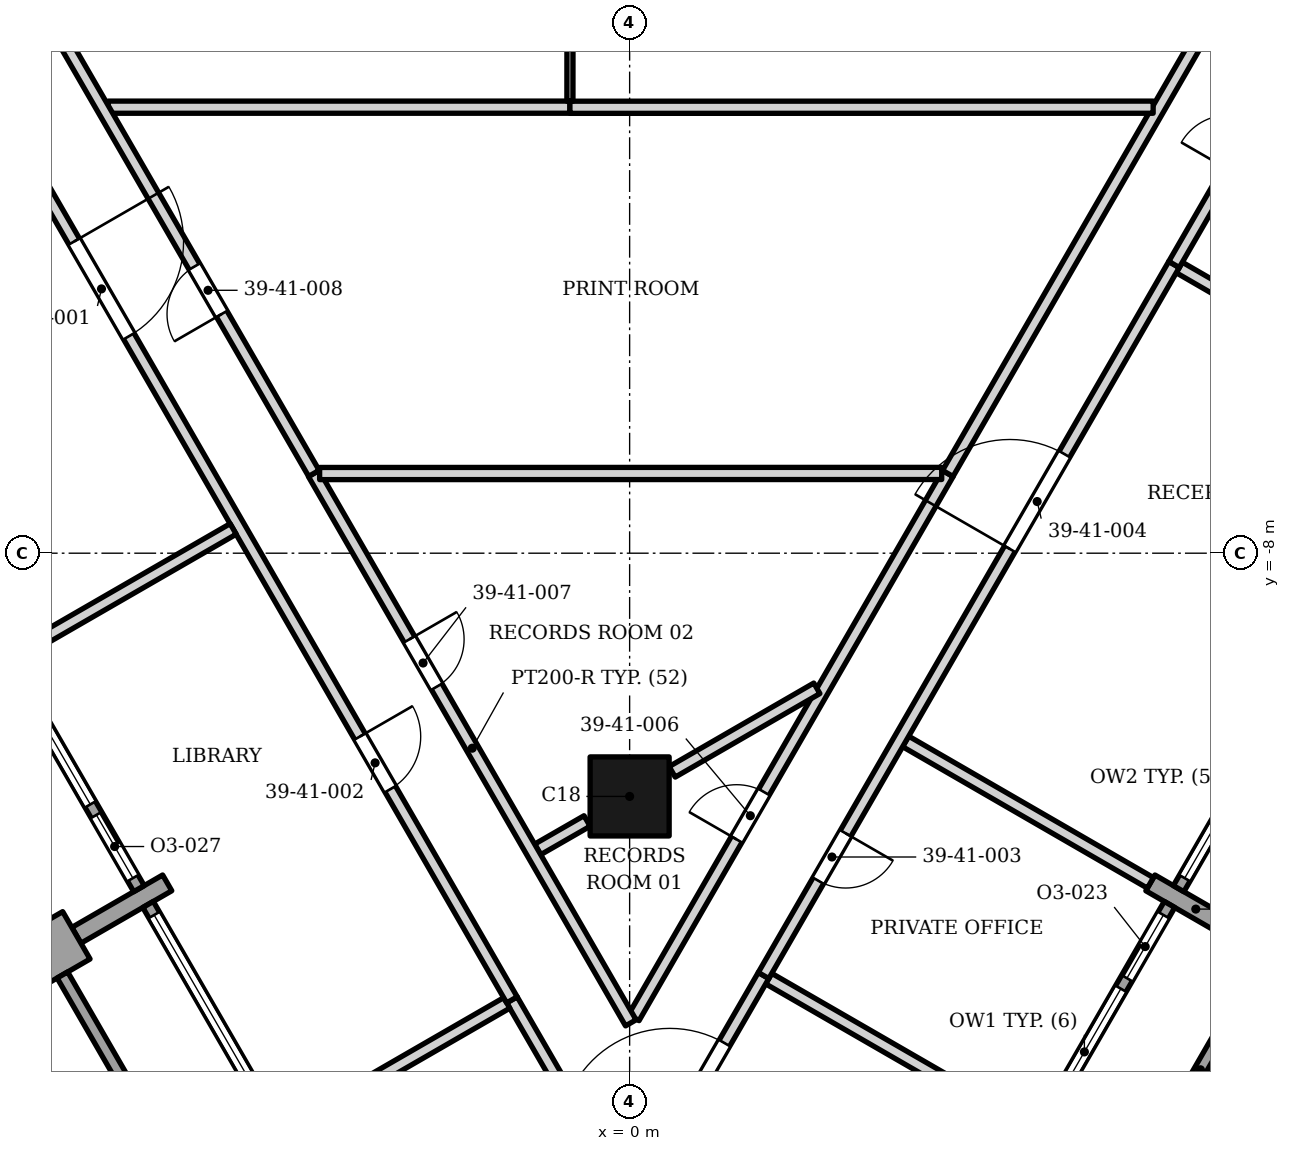
"""IFC4 building model, lengths in metres.
Left out: names, types, materials, properties, quantities, classifications, styles, units other than length and angle.
Written with IfcOpenShell. Run it as: python <this file> out.ifc"""

import sys

from ifc_helpers import new_model, si_unit, direction, frame, frame_2d, origin, origin_2d, place, context, subcontext, project, spatial, rectangle, extrude, element, fill, save


model = new_model("IFC4")
c1 = context("Model", 3, precision=1e-05, world=origin(), true_north=direction((0.0, 1.0)))
c2 = subcontext(c1, "Body", "Model", "MODEL_VIEW")
j1 = project(units=[si_unit("LENGTHUNIT", "METRE"), si_unit("PLANEANGLEUNIT", "RADIAN")], contexts=[c1])
p1 = place(None, origin())
s1 = spatial("IfcSite", under=j1, at=p1, CompositionType="ELEMENT")
p2 = place(p1, origin())
s2 = spatial("IfcBuilding", under=s1, at=p2, CompositionType="ELEMENT")
p3 = place(p2, frame((0.0, 0.0, 168.0)))
s3 = spatial("IfcBuildingStorey", under=s2, at=p3, CompositionType="ELEMENT", Elevation=168.0)
p4 = place(p3, frame((0.0, -12.0, 0.0), z_axis=(0.0, 0.0, 1.0), x_axis=(1.0, 0.0, 0.0)))
e1 = element("IfcColumn", 1, at=p4, inside=s3, PredefinedType="COLUMN", context=c2, shape_type="SweptSolid", body=[
    extrude(rectangle(XDim=1.3, YDim=1.3, at=origin_2d()), origin(), (0.0, 0.0, 1.0), 3.9),
])
p5 = place(p3, frame((-10.008, -14.809, 0.0), z_axis=(0.0, 0.0, 1.0), x_axis=(0.866088799389, 0.499890179513, 0.0)))
e2 = element("IfcWall", 2, at=p5, inside=s3, PredefinedType="SOLIDWALL", context=c2, shape_type="SweptSolid", body=[
    extrude(rectangle(XDim=1.05, YDim=0.9, at=frame_2d((0.525, 0.0))), origin(), (0.0, 0.0, 1.0), 3.0),
])
p6 = place(p3, frame((-9.099, -14.284, 0.0), z_axis=(0.0, 0.0, 1.0), x_axis=(0.866013532718, 0.500020560727, 0.0)))
e3 = element("IfcWall", 3, at=p6, inside=s3, PredefinedType="SOLIDWALL", context=c2, shape_type="SweptSolid", body=[
    extrude(rectangle(XDim=1.725, YDim=0.3, at=frame_2d((0.863, 0.0))), origin(), (0.0, 0.0, 1.0), 3.0),
])
p7 = place(p3, frame((-10.17, -9.879, 0.0), z_axis=(0.0, 0.0, 1.0), x_axis=(0.500002543286, -0.866023935413, 0.0)))
e4 = element("IfcWall", 4, at=p7, inside=s3, PredefinedType="ELEMENTEDWALL", context=c2, shape_type="SweptSolid", body=[
    extrude(rectangle(XDim=4.2, YDim=0.2, at=frame_2d((2.1, 0.0))), origin(), (0.0, 0.0, 1.0), 2.95),
])
p8 = place(p7, frame((0.2, 0.0, 0.45)))
e5 = element("IfcOpeningElement", 5, at=p8, cuts=e4, PredefinedType="OPENING", context=c2, shape_type="SweptSolid", body=[
    extrude(rectangle(XDim=2.4, YDim=2.25, at=frame_2d((1.2, 1.125))), frame((0.0, 0.11, 0.0), z_axis=(0.0, -1.0, 0.0), x_axis=(1.0, 0.0, 0.0)), (0.0, 0.0, 1.0), 0.22),
])
p9 = place(p7, frame((2.8, 0.0, 0.0)))
e6 = element("IfcOpeningElement", 6, at=p9, cuts=e4, PredefinedType="OPENING", context=c2, shape_type="SweptSolid", body=[
    extrude(rectangle(XDim=1.2, YDim=2.7, at=frame_2d((0.6, 1.35))), frame((0.0, 0.11, 0.0), z_axis=(0.0, -1.0, 0.0), x_axis=(1.0, 0.0, 0.0)), (0.0, 0.0, 1.0), 0.22),
])
p10 = place(p3, frame((-9.329, -14.936, 0.0), z_axis=(0.0, 0.0, 1.0), x_axis=(0.500012057535, -0.866018442252, 0.0)))
e7 = element("IfcWall", 7, at=p10, inside=s3, PredefinedType="SOLIDWALL", context=c2, shape_type="SweptSolid", body=[
    extrude(rectangle(XDim=3.6, YDim=0.2, at=frame_2d((1.8, 0.0))), origin(), (0.0, 0.0, 1.0), 3.0),
])
p11 = place(p3, frame((-7.92, -13.777, 0.0), z_axis=(0.0, 0.0, 1.0), x_axis=(0.500027713859, -0.866009402589, 0.0)))
e8 = element("IfcWall", 8, at=p11, inside=s3, PredefinedType="ELEMENTEDWALL", context=c2, shape_type="SweptSolid", body=[
    extrude(rectangle(XDim=4.2, YDim=0.2, at=frame_2d((2.1, 0.0))), origin(), (0.0, 0.0, 1.0), 3.0),
])
p12 = place(p11, frame((0.2, 0.0, 0.45)))
e9 = element("IfcOpeningElement", 9, at=p12, cuts=e8, PredefinedType="OPENING", context=c2, shape_type="SweptSolid", body=[
    extrude(rectangle(XDim=3.8, YDim=2.25, at=frame_2d((1.9, 1.125))), frame((0.0, 0.11, 0.0), z_axis=(0.0, -1.0, 0.0), x_axis=(1.0, 0.0, 0.0)), (0.0, 0.0, 1.0), 0.22),
])
p13 = place(p3, frame((10.058, -14.284, 0.0), z_axis=(0.0, 0.0, 1.0), x_axis=(-0.866013532718, 0.500020560727, 0.0)))
e10 = element("IfcWall", 10, at=p13, inside=s3, PredefinedType="SOLIDWALL", context=c2, shape_type="SweptSolid", body=[
    extrude(rectangle(XDim=1.725, YDim=0.3, at=frame_2d((0.863, 0.0))), origin(), (0.0, 0.0, 1.0), 3.0),
])
p14 = place(p3, frame((8.488, -18.054, 0.0), z_axis=(0.0, 0.0, 1.0), x_axis=(0.500012057535, 0.866018442252, 0.0)))
e11 = element("IfcWall", 11, at=p14, inside=s3, PredefinedType="SOLIDWALL", context=c2, shape_type="SweptSolid", body=[
    extrude(rectangle(XDim=3.6, YDim=0.2, at=frame_2d((1.8, 0.0))), origin(), (0.0, 0.0, 1.0), 3.0),
])
p15 = place(p3, frame((6.779, -17.414, 0.0), z_axis=(0.0, 0.0, 1.0), x_axis=(0.500027713859, 0.866009402589, 0.0)))
e12 = element("IfcWall", 12, at=p15, inside=s3, PredefinedType="ELEMENTEDWALL", context=c2, shape_type="SweptSolid", body=[
    extrude(rectangle(XDim=4.2, YDim=0.2, at=frame_2d((2.1, 0.0))), origin(), (0.0, 0.0, 1.0), 3.0),
])
p16 = place(p15, frame((0.2, 0.0, 0.45)))
e13 = element("IfcOpeningElement", 13, at=p16, cuts=e12, PredefinedType="OPENING", context=c2, shape_type="SweptSolid", body=[
    extrude(rectangle(XDim=2.4, YDim=2.25, at=frame_2d((1.2, 1.125))), frame((0.0, 0.11, 0.0), z_axis=(0.0, -1.0, 0.0), x_axis=(1.0, 0.0, 0.0)), (0.0, 0.0, 1.0), 0.22),
])
p17 = place(p15, frame((2.8, 0.0, 0.0)))
e14 = element("IfcOpeningElement", 14, at=p17, cuts=e12, PredefinedType="OPENING", context=c2, shape_type="SweptSolid", body=[
    extrude(rectangle(XDim=1.2, YDim=2.7, at=frame_2d((0.6, 1.35))), frame((0.0, 0.11, 0.0), z_axis=(0.0, -1.0, 0.0), x_axis=(1.0, 0.0, 0.0)), (0.0, 0.0, 1.0), 0.22),
])
p18 = place(p3, frame((9.029, -13.517, 0.0), z_axis=(0.0, 0.0, 1.0), x_axis=(0.500002543286, 0.866023935413, 0.0)))
e15 = element("IfcWall", 15, at=p18, inside=s3, PredefinedType="ELEMENTEDWALL", context=c2, shape_type="SweptSolid", body=[
    extrude(rectangle(XDim=4.2, YDim=0.2, at=frame_2d((2.1, 0.0))), origin(), (0.0, 0.0, 1.0), 2.95),
])
p19 = place(p18, frame((0.2, 0.0, 0.45)))
e16 = element("IfcOpeningElement", 16, at=p19, cuts=e15, PredefinedType="OPENING", context=c2, shape_type="SweptSolid", body=[
    extrude(rectangle(XDim=3.8, YDim=2.25, at=frame_2d((1.9, 1.125))), frame((0.0, 0.11, 0.0), z_axis=(0.0, -1.0, 0.0), x_axis=(1.0, 0.0, 0.0)), (0.0, 0.0, 1.0), 0.22),
])
p20 = place(p3, frame((-1.936, -15.345, 0.0), z_axis=(0.0, 0.0, 1.0), x_axis=(0.500383446004, -0.865803907918, 0.0)))
e17 = element("IfcWall", 17, at=p20, inside=s3, PredefinedType="PARTITIONING", context=c2, shape_type="SweptSolid", body=[
    extrude(rectangle(XDim=3.804, YDim=0.2, at=frame_2d((1.902, 0.0))), origin(), (0.0, 0.0, 1.0), 3.128),
])
p21 = place(p3, frame((2.287, -14.996, 0.0), z_axis=(0.0, 0.0, 1.0), x_axis=(0.866183837695, -0.499725483956, 0.0)))
e18 = element("IfcWall", 18, at=p21, inside=s3, PredefinedType="PARTITIONING", context=c2, shape_type="SweptSolid", body=[
    extrude(rectangle(XDim=4.649, YDim=0.2, at=frame_2d((2.325, 0.0))), origin(), (0.0, 0.0, 1.0), 3.052),
])
p22 = place(p3, frame((0.068, -15.638, 0.0), z_axis=(0.0, 0.0, 1.0), x_axis=(0.499989755964, 0.866031318101, 0.0)))
e19 = element("IfcWall", 19, at=p22, inside=s3, PredefinedType="PARTITIONING", context=c2, shape_type="SweptSolid", body=[
    extrude(rectangle(XDim=10.331, YDim=0.2, at=frame_2d((5.166, 0.0))), origin(), (0.0, 0.0, 1.0), 2.884),
])
p23 = place(p22, frame((3.385, 0.0, 0.0)))
e20 = element("IfcOpeningElement", 20, at=p23, cuts=e19, PredefinedType="OPENING", context=c2, shape_type="SweptSolid", body=[
    extrude(rectangle(XDim=0.9, YDim=2.1, at=frame_2d((0.45, 1.05))), frame((0.0, 0.11, 0.0), z_axis=(0.0, -1.0, 0.0), x_axis=(1.0, 0.0, 0.0)), (0.0, 0.0, 1.0), 0.22),
])
p24 = place(p3, frame((-5.355, -17.319, 0.0), z_axis=(0.0, 0.0, 1.0), x_axis=(0.866214094833, 0.499673035007, 0.0)))
e21 = element("IfcWall", 21, at=p24, inside=s3, PredefinedType="PARTITIONING", context=c2, shape_type="SweptSolid", body=[
    extrude(rectangle(XDim=3.849, YDim=0.2, at=frame_2d((1.925, 0.0))), origin(), (0.0, 0.0, 1.0), 3.128),
])
p25 = place(p3, frame((-10.936, 0.244, 0.0), z_axis=(0.0, 0.0, 1.0), x_axis=(0.5000018851, -0.866024315419, 0.0)))
e22 = element("IfcWall", 22, at=p25, inside=s3, PredefinedType="PARTITIONING", context=c2, shape_type="SweptSolid", body=[
    extrude(rectangle(XDim=18.0, YDim=0.2, at=frame_2d((9.0, 0.0))), origin(), (0.0, 0.0, 1.0), 2.884),
])
p26 = place(p25, frame((3.6, 0.0, 0.0)))
e23 = element("IfcOpeningElement", 23, at=p26, cuts=e22, PredefinedType="OPENING", context=c2, shape_type="SweptSolid", body=[
    extrude(rectangle(XDim=1.8, YDim=2.4, at=frame_2d((0.9, 1.2))), frame((0.0, 0.11, 0.0), z_axis=(0.0, -1.0, 0.0), x_axis=(1.0, 0.0, 0.0)), (0.0, 0.0, 1.0), 0.22),
])
p27 = place(p25, frame((13.0, 0.0, 0.0)))
e24 = element("IfcOpeningElement", 24, at=p27, cuts=e22, PredefinedType="OPENING", context=c2, shape_type="SweptSolid", body=[
    extrude(rectangle(XDim=1.0, YDim=2.4, at=frame_2d((0.5, 1.2))), frame((0.0, 0.11, 0.0), z_axis=(0.0, -1.0, 0.0), x_axis=(1.0, 0.0, 0.0)), (0.0, 0.0, 1.0), 0.22),
])
p28 = place(p3, frame((0.018, -18.725, 0.0), z_axis=(0.0, 0.0, 1.0), x_axis=(0.500372623754, 0.865810162448, 0.0)))
e25 = element("IfcWall", 25, at=p28, inside=s3, PredefinedType="PARTITIONING", context=c2, shape_type="SweptSolid", body=[
    extrude(rectangle(XDim=4.366, YDim=0.2, at=frame_2d((2.183, 0.0))), origin(), (0.0, 0.0, 1.0), 3.128),
])
p29 = place(p28, frame((1.283, 0.0, 0.0)))
e26 = element("IfcOpeningElement", 26, at=p29, cuts=e25, PredefinedType="OPENING", context=c2, shape_type="SweptSolid", body=[
    extrude(rectangle(XDim=1.8, YDim=2.4, at=frame_2d((0.9, 1.2))), frame((0.0, 0.11, 0.0), z_axis=(0.0, -1.0, 0.0), x_axis=(1.0, 0.0, 0.0)), (0.0, 0.0, 1.0), 0.22),
])
p30 = place(p3, frame((-1.512, -12.871, 0.0), z_axis=(0.0, 0.0, 1.0), x_axis=(0.866909118008, 0.498466228659, 0.0)))
e27 = element("IfcWall", 27, at=p30, inside=s3, PredefinedType="PARTITIONING", context=c2, shape_type="SweptSolid", body=[
    extrude(rectangle(XDim=0.937, YDim=0.2, at=frame_2d((0.469, 0.0))), origin(), (0.0, 0.0, 1.0), 3.73),
])
p31 = place(p3, frame((0.7, -11.596, 0.0), z_axis=(0.0, 0.0, 1.0), x_axis=(0.865997634224, 0.500048095206, 0.0)))
e28 = element("IfcWall", 28, at=p31, inside=s3, PredefinedType="PARTITIONING", context=c2, shape_type="SweptSolid", body=[
    extrude(rectangle(XDim=2.747, YDim=0.2, at=frame_2d((1.374, 0.0))), origin(), (0.0, 0.0, 1.0), 3.73),
])
p32 = place(p3, frame((4.539, -11.095, 0.0), z_axis=(0.0, 0.0, 1.0), x_axis=(0.865854964183, -0.50029509392, 0.0)))
e29 = element("IfcWall", 29, at=p32, inside=s3, PredefinedType="PARTITIONING", context=c2, shape_type="SweptSolid", body=[
    extrude(rectangle(XDim=4.65, YDim=0.2, at=frame_2d((2.325, 0.0))), origin(), (0.0, 0.0, 1.0), 2.884),
])
p33 = place(p3, frame((-9.855, -9.525, 0.0), z_axis=(0.0, 0.0, 1.0), x_axis=(0.866261590682, 0.499590688974, 0.0)))
e30 = element("IfcWall", 30, at=p33, inside=s3, PredefinedType="PARTITIONING", context=c2, shape_type="SweptSolid", body=[
    extrude(rectangle(XDim=3.85, YDim=0.2, at=frame_2d((1.925, 0.0))), origin(), (0.0, 0.0, 1.0), 3.052),
])
p34 = place(p3, frame((-5.196, -6.69, 0.0), z_axis=(0.0, 0.0, 1.0), x_axis=(0.499990567915, -0.866030849332, 0.0)))
e31 = element("IfcWall", 31, at=p34, inside=s3, PredefinedType="PARTITIONING", context=c2, shape_type="SweptSolid", body=[
    extrude(rectangle(XDim=10.431, YDim=0.2, at=frame_2d((5.215, 0.0))), origin(), (0.0, 0.0, 1.0), 2.884),
])
p35 = place(p34, frame((3.148, 0.0, 0.0)))
e32 = element("IfcOpeningElement", 32, at=p35, cuts=e31, PredefinedType="OPENING", context=c2, shape_type="SweptSolid", body=[
    extrude(rectangle(XDim=0.9, YDim=2.1, at=frame_2d((0.45, 1.05))), frame((0.0, 0.11, 0.0), z_axis=(0.0, -1.0, 0.0), x_axis=(1.0, 0.0, 0.0)), (0.0, 0.0, 1.0), 0.22),
])
p36 = place(p3, frame((-5.098, -6.69, 0.0), z_axis=(0.0, 0.0, 1.0), x_axis=(0.99999998975, 0.000143177586, 0.0)))
e33 = element("IfcWall", 33, at=p36, inside=s3, PredefinedType="PARTITIONING", context=c2, shape_type="SweptSolid", body=[
    extrude(rectangle(XDim=10.231, YDim=0.2, at=frame_2d((5.115, 0.0))), origin(), (0.0, 0.0, 1.0), 3.73),
])
p37 = place(p3, frame((5.233, -6.688, 0.0), z_axis=(0.0, 0.0, 1.0), x_axis=(0.499991401208, 0.866030368243, 0.0)))
e34 = element("IfcWall", 34, at=p37, inside=s3, PredefinedType="PARTITIONING", context=c2, shape_type="SweptSolid", body=[
    extrude(rectangle(XDim=11.996, YDim=0.2, at=frame_2d((5.998, 0.0))), origin(), (0.0, 0.0, 1.0), 3.052),
])
p38 = place(p3, frame((9.04, -3.302, 0.0), z_axis=(0.0, 0.0, 1.0), x_axis=(0.865844341998, -0.500313477162, 0.0)))
e35 = element("IfcWall", 35, at=p38, inside=s3, PredefinedType="PARTITIONING", context=c2, shape_type="SweptSolid", body=[
    extrude(rectangle(XDim=4.648, YDim=0.2, at=frame_2d((2.324, 0.0))), origin(), (0.0, 0.0, 1.0), 3.052),
])
p39 = place(p3, frame((2.202, -14.945, 0.0), z_axis=(0.0, 0.0, 1.0), x_axis=(0.499997969693, 0.866026575979, 0.0)))
e36 = element("IfcWall", 36, at=p39, inside=s3, PredefinedType="PARTITIONING", context=c2, shape_type="SweptSolid", body=[
    extrude(rectangle(XDim=13.5, YDim=0.2, at=frame_2d((6.75, 0.0))), origin(), (0.0, 0.0, 1.0), 2.884),
])
p40 = place(p39, frame((1.8, 0.0, 0.0)))
e37 = element("IfcOpeningElement", 37, at=p40, cuts=e36, PredefinedType="OPENING", context=c2, shape_type="SweptSolid", body=[
    extrude(rectangle(XDim=0.9, YDim=2.1, at=frame_2d((0.45, 1.05))), frame((0.0, 0.11, 0.0), z_axis=(0.0, -1.0, 0.0), x_axis=(1.0, 0.0, 0.0)), (0.0, 0.0, 1.0), 0.22),
])
p41 = place(p39, frame((8.1, 0.0, 0.0)))
e38 = element("IfcOpeningElement", 38, at=p41, cuts=e36, PredefinedType="OPENING", context=c2, shape_type="SweptSolid", body=[
    extrude(rectangle(XDim=1.8, YDim=2.4, at=frame_2d((0.9, 1.2))), frame((0.0, 0.11, 0.0), z_axis=(0.0, -1.0, 0.0), x_axis=(1.0, 0.0, 0.0)), (0.0, 0.0, 1.0), 0.22),
])
p42 = place(p3, frame((-8.575, -0.665, 0.0), z_axis=(0.0, 0.0, 1.0), x_axis=(0.999999999483, 3.2155375e-05, 0.0)))
e39 = element("IfcWall", 39, at=p42, inside=s3, PredefinedType="PARTITIONING", context=c2, shape_type="SweptSolid", body=[
    extrude(rectangle(XDim=7.593, YDim=0.2, at=frame_2d((3.796, 0.0))), origin(), (0.0, 0.0, 1.0), 3.73),
])
p43 = place(p3, frame((-0.982, -0.667, 0.0), z_axis=(0.0, 0.0, 1.0), x_axis=(0.999999988339, 0.000152714498, 0.0)))
e40 = element("IfcWall", 40, at=p43, inside=s3, PredefinedType="PARTITIONING", context=c2, shape_type="SweptSolid", body=[
    extrude(rectangle(XDim=9.592, YDim=0.2, at=frame_2d((4.796, 0.0))), origin(), (0.0, 0.0, 1.0), 3.73),
])
p44 = place(p3, frame((8.954, -3.252, 0.0), z_axis=(0.0, 0.0, 1.0), x_axis=(0.499989943423, 0.866031209874, 0.0)))
e41 = element("IfcWall", 41, at=p44, inside=s3, PredefinedType="PARTITIONING", context=c2, shape_type="SweptSolid", body=[
    extrude(rectangle(XDim=4.398, YDim=0.2, at=frame_2d((2.199, 0.0))), origin(), (0.0, 0.0, 1.0), 3.052),
])
p45 = place(p44, frame((1.798, 0.0, 0.0)))
e42 = element("IfcOpeningElement", 42, at=p45, cuts=e41, PredefinedType="OPENING", context=c2, shape_type="SweptSolid", body=[
    extrude(rectangle(XDim=0.9, YDim=2.1, at=frame_2d((0.45, 1.05))), frame((0.0, 0.11, 0.0), z_axis=(0.0, -1.0, 0.0), x_axis=(1.0, 0.0, 0.0)), (0.0, 0.0, 1.0), 0.22),
])
p46 = place(p3, frame((-0.982, -0.567, 0.0), z_axis=(0.0, 0.0, 1.0), x_axis=(0.000738240676, 0.9999997275, 0.0)))
e43 = element("IfcWall", 43, at=p46, inside=s3, PredefinedType="PARTITIONING", context=c2, shape_type="SweptSolid", body=[
    extrude(rectangle(XDim=2.315, YDim=0.1, at=frame_2d((1.157, 0.0))), origin(), (0.0, 0.0, 1.0), 3.73),
])
p47 = place(p3, frame((-11.198, 3.699, 0.0), z_axis=(0.0, 0.0, 1.0), x_axis=(0.500539648856, -0.865713613109, 0.0)))
e44 = element("IfcWall", 44, at=p47, inside=s3, PredefinedType="PARTITIONING", context=c2, shape_type="SweptSolid", body=[
    extrude(rectangle(XDim=11.997, YDim=0.2, at=frame_2d((5.999, 0.0))), origin(), (0.0, 0.0, 1.0), 3.052),
])
p48 = place(p47, frame((8.07, 0.0, 0.0)))
e45 = element("IfcOpeningElement", 45, at=p48, cuts=e44, PredefinedType="OPENING", context=c2, shape_type="SweptSolid", body=[
    extrude(rectangle(XDim=0.9, YDim=2.1, at=frame_2d((0.45, 1.05))), frame((0.0, 0.11, 0.0), z_axis=(0.0, -1.0, 0.0), x_axis=(1.0, 0.0, 0.0)), (0.0, 0.0, 1.0), 0.22),
])
p49 = place(p8, origin())
e46 = element("IfcWindow", 46, at=p49, inside=s3, PartitioningType="SINGLE_PANEL", PredefinedType="WINDOW", context=c2, shape_type="SweptSolid", body=[
    extrude(rectangle(XDim=2.4, YDim=2.25, at=frame_2d((1.2, 1.125))), frame((0.0, 0.03, 0.0), z_axis=(0.0, -1.0, 0.0), x_axis=(1.0, 0.0, 0.0)), (0.0, 0.0, 1.0), 0.06),
])
fill(e5, e46)
p50 = place(p9, origin())
e47 = element("IfcDoor", 47, at=p50, inside=s3, OperationType="SINGLE_SWING_LEFT", PredefinedType="DOOR", context=c2, shape_type="SweptSolid", body=[
    extrude(rectangle(XDim=1.2, YDim=2.7, at=frame_2d((0.6, 1.35))), frame((0.0, 0.025, 0.0), z_axis=(0.0, -1.0, 0.0), x_axis=(1.0, 0.0, 0.0)), (0.0, 0.0, 1.0), 0.05),
])
fill(e6, e47)
p51 = place(p12, origin())
e48 = element("IfcWindow", 48, at=p51, inside=s3, PartitioningType="SINGLE_PANEL", PredefinedType="WINDOW", context=c2, shape_type="SweptSolid", body=[
    extrude(rectangle(XDim=3.8, YDim=2.25, at=frame_2d((1.9, 1.125))), frame((0.0, 0.03, 0.0), z_axis=(0.0, -1.0, 0.0), x_axis=(1.0, 0.0, 0.0)), (0.0, 0.0, 1.0), 0.06),
])
fill(e9, e48)
p52 = place(p16, origin())
e49 = element("IfcWindow", 49, at=p52, inside=s3, PartitioningType="SINGLE_PANEL", PredefinedType="WINDOW", context=c2, shape_type="SweptSolid", body=[
    extrude(rectangle(XDim=2.4, YDim=2.25, at=frame_2d((1.2, 1.125))), frame((0.0, 0.03, 0.0), z_axis=(0.0, -1.0, 0.0), x_axis=(1.0, 0.0, 0.0)), (0.0, 0.0, 1.0), 0.06),
])
fill(e13, e49)
p53 = place(p17, origin())
e50 = element("IfcDoor", 50, at=p53, inside=s3, OperationType="SINGLE_SWING_LEFT", PredefinedType="DOOR", context=c2, shape_type="SweptSolid", body=[
    extrude(rectangle(XDim=1.2, YDim=2.7, at=frame_2d((0.6, 1.35))), frame((0.0, 0.025, 0.0), z_axis=(0.0, -1.0, 0.0), x_axis=(1.0, 0.0, 0.0)), (0.0, 0.0, 1.0), 0.05),
])
fill(e14, e50)
p54 = place(p19, origin())
e51 = element("IfcWindow", 51, at=p54, inside=s3, PartitioningType="SINGLE_PANEL", PredefinedType="WINDOW", context=c2, shape_type="SweptSolid", body=[
    extrude(rectangle(XDim=3.8, YDim=2.25, at=frame_2d((1.9, 1.125))), frame((0.0, 0.03, 0.0), z_axis=(0.0, -1.0, 0.0), x_axis=(1.0, 0.0, 0.0)), (0.0, 0.0, 1.0), 0.06),
])
fill(e16, e51)
p55 = place(p26, origin())
e52 = element("IfcDoor", 52, at=p55, inside=s3, OperationType="DOUBLE_DOOR_SINGLE_SWING", PredefinedType="DOOR", context=c2, shape_type="SweptSolid", body=[
    extrude(rectangle(XDim=1.8, YDim=2.4, at=frame_2d((0.9, 1.2))), frame((0.0, 0.025, 0.0), z_axis=(0.0, -1.0, 0.0), x_axis=(1.0, 0.0, 0.0)), (0.0, 0.0, 1.0), 0.05),
])
fill(e23, e52)
p56 = place(p27, origin())
e53 = element("IfcDoor", 53, at=p56, inside=s3, OperationType="SINGLE_SWING_LEFT", PredefinedType="DOOR", context=c2, shape_type="SweptSolid", body=[
    extrude(rectangle(XDim=1.0, YDim=2.4, at=frame_2d((0.5, 1.2))), frame((0.0, 0.025, 0.0), z_axis=(0.0, -1.0, 0.0), x_axis=(1.0, 0.0, 0.0)), (0.0, 0.0, 1.0), 0.05),
])
fill(e24, e53)
p57 = place(p40, origin())
e54 = element("IfcDoor", 54, at=p57, inside=s3, OperationType="SINGLE_SWING_RIGHT", PredefinedType="DOOR", context=c2, shape_type="SweptSolid", body=[
    extrude(rectangle(XDim=0.9, YDim=2.1, at=frame_2d((0.45, 1.05))), frame((0.0, 0.025, 0.0), z_axis=(0.0, -1.0, 0.0), x_axis=(1.0, 0.0, 0.0)), (0.0, 0.0, 1.0), 0.05),
])
fill(e37, e54)
p58 = place(p41, origin())
e55 = element("IfcDoor", 55, at=p58, inside=s3, OperationType="DOUBLE_DOOR_SINGLE_SWING", PredefinedType="DOOR", context=c2, shape_type="SweptSolid", body=[
    extrude(rectangle(XDim=1.8, YDim=2.4, at=frame_2d((0.9, 1.2))), frame((0.0, 0.025, 0.0), z_axis=(0.0, -1.0, 0.0), x_axis=(1.0, 0.0, 0.0)), (0.0, 0.0, 1.0), 0.05),
])
fill(e38, e55)
p59 = place(p23, origin())
e56 = element("IfcDoor", 56, at=p59, inside=s3, OperationType="SINGLE_SWING_LEFT", PredefinedType="DOOR", context=c2, shape_type="SweptSolid", body=[
    extrude(rectangle(XDim=0.9, YDim=2.1, at=frame_2d((0.45, 1.05))), frame((0.0, 0.025, 0.0), z_axis=(0.0, -1.0, 0.0), x_axis=(1.0, 0.0, 0.0)), (0.0, 0.0, 1.0), 0.05),
])
fill(e20, e56)
p60 = place(p35, origin())
e57 = element("IfcDoor", 57, at=p60, inside=s3, OperationType="SINGLE_SWING_LEFT", PredefinedType="DOOR", context=c2, shape_type="SweptSolid", body=[
    extrude(rectangle(XDim=0.9, YDim=2.1, at=frame_2d((0.45, 1.05))), frame((0.0, 0.025, 0.0), z_axis=(0.0, -1.0, 0.0), x_axis=(1.0, 0.0, 0.0)), (0.0, 0.0, 1.0), 0.05),
])
fill(e32, e57)
p61 = place(p48, origin())
e58 = element("IfcDoor", 58, at=p61, inside=s3, OperationType="SINGLE_SWING_RIGHT", PredefinedType="DOOR", context=c2, shape_type="SweptSolid", body=[
    extrude(rectangle(XDim=0.9, YDim=2.1, at=frame_2d((0.45, 1.05))), frame((0.0, 0.025, 0.0), z_axis=(0.0, -1.0, 0.0), x_axis=(1.0, 0.0, 0.0)), (0.0, 0.0, 1.0), 0.05),
])
fill(e45, e58)
p62 = place(p29, origin())
e59 = element("IfcDoor", 59, at=p62, inside=s3, OperationType="DOUBLE_DOOR_SINGLE_SWING", PredefinedType="DOOR", context=c2, shape_type="SweptSolid", body=[
    extrude(rectangle(XDim=1.8, YDim=2.4, at=frame_2d((0.9, 1.2))), frame((0.0, 0.025, 0.0), z_axis=(0.0, -1.0, 0.0), x_axis=(1.0, 0.0, 0.0)), (0.0, 0.0, 1.0), 0.05),
])
fill(e26, e59)
save(model, sys.argv[1])
